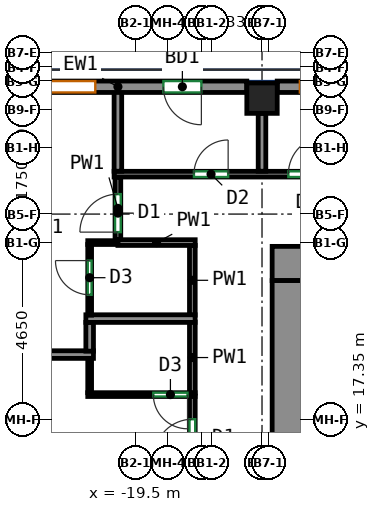
"""IFC4 building model, lengths in metres.
Left out: names, types, materials, properties, quantities, classifications, styles, units other than length and angle.
Written with IfcOpenShell. Run it as: python <this file> out.ifc"""

import sys

from ifc_helpers import new_model, si_unit, direction, frame, frame_2d, origin, origin_2d, place, context, subcontext, project, spatial, rectangle, extrude, source, transform, mapped, element, fill, save


model = new_model("IFC4")
c1 = context("Model", 3, precision=1e-05, world=origin(), true_north=direction((0.0, 1.0)))
c2 = subcontext(c1, "Body", "Model", "MODEL_VIEW")
j1 = project(units=[si_unit("LENGTHUNIT", "METRE"), si_unit("PLANEANGLEUNIT", "RADIAN")], contexts=[c1])
p1 = place(None, origin())
s1 = spatial("IfcSite", under=j1, at=p1, CompositionType="ELEMENT")
p2 = place(p1, origin())
s2 = spatial("IfcBuilding", under=s1, at=p2, CompositionType="ELEMENT")
p3 = place(p2, frame((0.0, 0.0, 168.5)))
s3 = spatial("IfcBuildingStorey", under=s2, at=p3, CompositionType="ELEMENT", Elevation=168.5)
m1 = source(origin(), c2, "Body", "SweptSolid", [
    extrude(rectangle(XDim=0.8, YDim=0.8, at=origin_2d()), origin(), (0.0, 0.0, 1.0), 3.12),
])
p4 = place(p3, frame((-16.167, 25.8, 0.0), z_axis=(0.0, 0.0, 1.0), x_axis=(1.0, 0.0, 0.0)))
e1 = element("IfcColumn", 1, at=p4, inside=s3, PredefinedType="COLUMN", context=c2, shape_type="MappedRepresentation", body=[
    mapped(m1, transform((0.0, 0.0, 0.0))),
])
m2 = source(origin(), c2, "Body", "SweptSolid", [
    extrude(rectangle(XDim=33.9, YDim=0.9, at=frame_2d((16.95, 0.0))), origin(), (0.0, 0.0, 1.0), 3.12),
])
p5 = place(p3, frame((-15.9, 21.45, 0.0), z_axis=(0.0, 0.0, 1.0), x_axis=(1.0, 0.0, 0.0)))
e2 = element("IfcWall", 2, at=p5, inside=s3, PredefinedType="SHEAR", context=c2, shape_type="MappedRepresentation", body=[
    mapped(m2, transform((0.0, 0.0, 0.0))),
])
p6 = place(p5, frame((8.42, 0.0, 0.0)))
e3 = element("IfcOpeningElement", 3, at=p6, cuts=e2, PredefinedType="OPENING", context=c2, shape_type="SweptSolid", body=[
    extrude(rectangle(XDim=0.9, YDim=2.1, at=frame_2d((0.45, 1.05))), frame((0.0, 0.46, 0.0), z_axis=(0.0, -1.0, 0.0), x_axis=(1.0, 0.0, 0.0)), (0.0, 0.0, 1.0), 0.92),
])
p7 = place(p5, frame((15.12, 0.0, 0.0)))
e4 = element("IfcOpeningElement", 4, at=p7, cuts=e2, PredefinedType="OPENING", context=c2, shape_type="SweptSolid", body=[
    extrude(rectangle(XDim=0.9, YDim=2.1, at=frame_2d((0.45, 1.05))), frame((0.0, 0.46, 0.0), z_axis=(0.0, -1.0, 0.0), x_axis=(1.0, 0.0, 0.0)), (0.0, 0.0, 1.0), 0.92),
])
p8 = place(p5, frame((19.944, 0.0, 0.0)))
e5 = element("IfcOpeningElement", 5, at=p8, cuts=e2, PredefinedType="OPENING", context=c2, shape_type="SweptSolid", body=[
    extrude(rectangle(XDim=0.9, YDim=2.1, at=frame_2d((0.45, 1.05))), frame((0.0, 0.46, 0.0), z_axis=(0.0, -1.0, 0.0), x_axis=(1.0, 0.0, 0.0)), (0.0, 0.0, 1.0), 0.92),
])
p9 = place(p5, frame((25.304, 0.0, 0.0)))
e6 = element("IfcOpeningElement", 6, at=p9, cuts=e2, PredefinedType="OPENING", context=c2, shape_type="SweptSolid", body=[
    extrude(rectangle(XDim=0.9, YDim=2.1, at=frame_2d((0.45, 1.05))), frame((0.0, 0.46, 0.0), z_axis=(0.0, -1.0, 0.0), x_axis=(1.0, 0.0, 0.0)), (0.0, 0.0, 1.0), 0.92),
])
p10 = place(p5, frame((2.425, 0.0, 0.0)))
e7 = element("IfcOpeningElement", 7, at=p10, cuts=e2, PredefinedType="OPENING", context=c2, shape_type="SweptSolid", body=[
    extrude(rectangle(XDim=0.9, YDim=2.1, at=frame_2d((0.45, 1.05))), frame((0.0, 0.46, 0.0), z_axis=(0.0, -1.0, 0.0), x_axis=(1.0, 0.0, 0.0)), (0.0, 0.0, 1.0), 0.92),
])
p11 = place(p5, frame((30.575, 0.0, 0.0)))
e8 = element("IfcOpeningElement", 8, at=p11, cuts=e2, PredefinedType="OPENING", context=c2, shape_type="SweptSolid", body=[
    extrude(rectangle(XDim=0.9, YDim=2.1, at=frame_2d((0.45, 1.05))), frame((0.0, 0.46, 0.0), z_axis=(0.0, -1.0, 0.0), x_axis=(1.0, 0.0, 0.0)), (0.0, 0.0, 1.0), 0.92),
])
m3 = source(origin(), c2, "Body", "SweptSolid", [
    extrude(rectangle(XDim=12.0, YDim=0.9, at=frame_2d((6.0, 0.0))), origin(), (0.0, 0.0, 1.0), 3.12),
])
p12 = place(p3, frame((-15.45, 9.0, 0.0), z_axis=(0.0, 0.0, 1.0), x_axis=(0.0, 1.0, 0.0)))
e9 = element("IfcWall", 9, at=p12, inside=s3, PredefinedType="SHEAR", context=c2, shape_type="MappedRepresentation", body=[
    mapped(m3, transform((0.0, 0.0, 0.0))),
])
m4 = source(origin(), c2, "Body", "SweptSolid", [
    extrude(rectangle(XDim=6.783, YDim=0.3, at=frame_2d((3.392, 0.0))), origin(), (0.0, 0.0, 1.0), 3.12),
])
p13 = place(p3, frame((-8.983, 26.1, 0.0), z_axis=(0.0, 0.0, 1.0), x_axis=(-1.0, 0.0, 0.0)))
e10 = element("IfcWall", 10, at=p13, inside=s3, PredefinedType="SOLIDWALL", context=c2, shape_type="MappedRepresentation", body=[
    mapped(m4, transform((0.0, 0.0, 0.0))),
])
p14 = place(p13, frame((1.196, 0.0, 0.0)))
e11 = element("IfcOpeningElement", 11, at=p14, cuts=e10, PredefinedType="OPENING", context=c2, shape_type="SweptSolid", body=[
    extrude(rectangle(XDim=1.0, YDim=2.1, at=frame_2d((0.5, 1.05))), frame((0.0, 0.16, 0.0), z_axis=(0.0, -1.0, 0.0), x_axis=(1.0, 0.0, 0.0)), (0.0, 0.0, 1.0), 0.32),
])
p15 = place(p13, frame((3.988, 0.0, 0.85)))
e12 = element("IfcOpeningElement", 12, at=p15, cuts=e10, PredefinedType="OPENING", context=c2, shape_type="SweptSolid", body=[
    extrude(rectangle(XDim=2.2, YDim=1.95, at=frame_2d((1.1, 0.975))), frame((0.0, 0.16, 0.0), z_axis=(0.0, -1.0, 0.0), x_axis=(1.0, 0.0, 0.0)), (0.0, 0.0, 1.0), 0.32),
])
m5 = source(origin(), c2, "Body", "SweptSolid", [
    extrude(rectangle(XDim=6.783, YDim=0.3, at=frame_2d((3.392, 0.0))), origin(), (0.0, 0.0, 1.0), 3.12),
])
p16 = place(p3, frame((-16.567, 26.1, 0.0), z_axis=(0.0, 0.0, 1.0), x_axis=(-1.0, 0.0, 0.0)))
e13 = element("IfcWall", 13, at=p16, inside=s3, PredefinedType="SOLIDWALL", context=c2, shape_type="MappedRepresentation", body=[
    mapped(m5, transform((0.0, 0.0, 0.0))),
])
p17 = place(p16, frame((1.196, 0.0, 0.0)))
e14 = element("IfcOpeningElement", 14, at=p17, cuts=e13, PredefinedType="OPENING", context=c2, shape_type="SweptSolid", body=[
    extrude(rectangle(XDim=1.0, YDim=2.1, at=frame_2d((0.5, 1.05))), frame((0.0, 0.16, 0.0), z_axis=(0.0, -1.0, 0.0), x_axis=(1.0, 0.0, 0.0)), (0.0, 0.0, 1.0), 0.32),
])
p18 = place(p16, frame((3.988, 0.0, 0.85)))
e15 = element("IfcOpeningElement", 15, at=p18, cuts=e13, PredefinedType="OPENING", context=c2, shape_type="SweptSolid", body=[
    extrude(rectangle(XDim=2.2, YDim=1.95, at=frame_2d((1.1, 0.975))), frame((0.0, 0.16, 0.0), z_axis=(0.0, -1.0, 0.0), x_axis=(1.0, 0.0, 0.0)), (0.0, 0.0, 1.0), 0.32),
])
p19 = place(p3, frame((-18.0, 14.927, 0.0), z_axis=(0.0, 0.0, 1.0), x_axis=(0.0, 1.0, 0.0)))
e16 = element("IfcWall", 16, at=p19, inside=s3, PredefinedType="PARTITIONING", context=c2, shape_type="SweptSolid", body=[
    extrude(rectangle(XDim=3.033, YDim=0.15, at=frame_2d((1.517, 0.0))), origin(), (0.0, 0.0, 1.0), 3.12),
])
p20 = place(p19, frame((1.425, 0.0, 0.0)))
e17 = element("IfcOpeningElement", 17, at=p20, cuts=e16, PredefinedType="OPENING", context=c2, shape_type="SweptSolid", body=[
    extrude(rectangle(XDim=1.0, YDim=2.1, at=frame_2d((0.5, 1.05))), frame((0.0, 0.085, 0.0), z_axis=(0.0, -1.0, 0.0), x_axis=(1.0, 0.0, 0.0)), (0.0, 0.0, 1.0), 0.17),
])
p21 = place(p3, frame((-18.0, 18.04, 0.0), z_axis=(0.0, 0.0, 1.0), x_axis=(0.0, 1.0, 0.0)))
e18 = element("IfcWall", 18, at=p21, inside=s3, PredefinedType="PARTITIONING", context=c2, shape_type="SweptSolid", body=[
    extrude(rectangle(XDim=1.87, YDim=0.15, at=frame_2d((0.935, 0.0))), origin(), (0.0, 0.0, 1.0), 3.12),
])
p22 = place(p3, frame((-19.959, 22.075, 0.0), z_axis=(0.0, 0.0, 1.0), x_axis=(0.0, 1.0, 0.0)))
e19 = element("IfcWall", 19, at=p22, inside=s3, PredefinedType="PARTITIONING", context=c2, shape_type="SweptSolid", body=[
    extrude(rectangle(XDim=1.65, YDim=0.15, at=frame_2d((0.825, 0.0))), origin(), (0.0, 0.0, 1.0), 3.12),
])
p23 = place(p22, frame((0.2, 0.0, 0.0)))
e20 = element("IfcOpeningElement", 20, at=p23, cuts=e19, PredefinedType="OPENING", context=c2, shape_type="SweptSolid", body=[
    extrude(rectangle(XDim=1.0, YDim=2.1, at=frame_2d((0.5, 1.05))), frame((0.0, 0.085, 0.0), z_axis=(0.0, -1.0, 0.0), x_axis=(1.0, 0.0, 0.0)), (0.0, 0.0, 1.0), 0.17),
])
p24 = place(p3, frame((-18.0, 20.09, 0.0), z_axis=(0.0, 0.0, 1.0), x_axis=(0.0, 1.0, 0.0)))
e21 = element("IfcWall", 21, at=p24, inside=s3, PredefinedType="PARTITIONING", context=c2, shape_type="SweptSolid", body=[
    extrude(rectangle(XDim=1.835, YDim=0.15, at=frame_2d((0.917, 0.0))), origin(), (0.0, 0.0, 1.0), 3.12),
])
p25 = place(p3, frame((-19.959, 22.0, 0.0), z_axis=(0.0, 0.0, 1.0), x_axis=(1.0, 0.0, 0.0)))
e22 = element("IfcWall", 22, at=p25, inside=s3, PredefinedType="PARTITIONING", context=c2, shape_type="SweptSolid", body=[
    extrude(rectangle(XDim=2.034, YDim=0.15, at=frame_2d((1.017, 0.0))), origin(), (0.0, 0.0, 1.0), 3.12),
])
p26 = place(p3, frame((-20.059, 23.8, 0.0), z_axis=(0.0, 0.0, 1.0), x_axis=(1.0, 0.0, 0.0)))
e23 = element("IfcWall", 23, at=p26, inside=s3, PredefinedType="PARTITIONING", context=c2, shape_type="SweptSolid", body=[
    extrude(rectangle(XDim=41.909, YDim=0.15, at=frame_2d((20.955, 0.0))), origin(), (0.0, 0.0, 1.0), 3.12),
])
p27 = place(p26, frame((2.101, 0.0, 0.0)))
e24 = element("IfcOpeningElement", 24, at=p27, cuts=e23, PredefinedType="OPENING", context=c2, shape_type="SweptSolid", body=[
    extrude(rectangle(XDim=0.9, YDim=2.1, at=frame_2d((0.45, 1.05))), frame((0.0, 0.085, 0.0), z_axis=(0.0, -1.0, 0.0), x_axis=(1.0, 0.0, 0.0)), (0.0, 0.0, 1.0), 0.17),
])
p28 = place(p26, frame((4.585, 0.0, 0.0)))
e25 = element("IfcOpeningElement", 25, at=p28, cuts=e23, PredefinedType="OPENING", context=c2, shape_type="SweptSolid", body=[
    extrude(rectangle(XDim=1.0, YDim=2.1, at=frame_2d((0.5, 1.05))), frame((0.0, 0.085, 0.0), z_axis=(0.0, -1.0, 0.0), x_axis=(1.0, 0.0, 0.0)), (0.0, 0.0, 1.0), 0.17),
])
p29 = place(p26, frame((8.175, 0.0, 0.0)))
e26 = element("IfcOpeningElement", 26, at=p29, cuts=e23, PredefinedType="OPENING", context=c2, shape_type="SweptSolid", body=[
    extrude(rectangle(XDim=0.9, YDim=2.1, at=frame_2d((0.45, 1.05))), frame((0.0, 0.085, 0.0), z_axis=(0.0, -1.0, 0.0), x_axis=(1.0, 0.0, 0.0)), (0.0, 0.0, 1.0), 0.17),
])
p30 = place(p26, frame((13.173, 0.0, 0.0)))
e27 = element("IfcOpeningElement", 27, at=p30, cuts=e23, PredefinedType="OPENING", context=c2, shape_type="SweptSolid", body=[
    extrude(rectangle(XDim=1.0, YDim=2.1, at=frame_2d((0.5, 1.05))), frame((0.0, 0.085, 0.0), z_axis=(0.0, -1.0, 0.0), x_axis=(1.0, 0.0, 0.0)), (0.0, 0.0, 1.0), 0.17),
])
p31 = place(p26, frame((15.658, 0.0, 0.0)))
e28 = element("IfcOpeningElement", 28, at=p31, cuts=e23, PredefinedType="OPENING", context=c2, shape_type="SweptSolid", body=[
    extrude(rectangle(XDim=0.9, YDim=2.1, at=frame_2d((0.45, 1.05))), frame((0.0, 0.085, 0.0), z_axis=(0.0, -1.0, 0.0), x_axis=(1.0, 0.0, 0.0)), (0.0, 0.0, 1.0), 0.17),
])
p32 = place(p26, frame((21.315, 0.0, 0.0)))
e29 = element("IfcOpeningElement", 29, at=p32, cuts=e23, PredefinedType="OPENING", context=c2, shape_type="SweptSolid", body=[
    extrude(rectangle(XDim=0.9, YDim=2.1, at=frame_2d((0.45, 1.05))), frame((0.0, 0.085, 0.0), z_axis=(0.0, -1.0, 0.0), x_axis=(1.0, 0.0, 0.0)), (0.0, 0.0, 1.0), 0.17),
])
p33 = place(p26, frame((24.625, 0.0, 0.0)))
e30 = element("IfcOpeningElement", 30, at=p33, cuts=e23, PredefinedType="OPENING", context=c2, shape_type="SweptSolid", body=[
    extrude(rectangle(XDim=1.0, YDim=2.1, at=frame_2d((0.5, 1.05))), frame((0.0, 0.085, 0.0), z_axis=(0.0, -1.0, 0.0), x_axis=(1.0, 0.0, 0.0)), (0.0, 0.0, 1.0), 0.17),
])
p34 = place(p26, frame((29.043, 0.0, 0.0)))
e31 = element("IfcOpeningElement", 31, at=p34, cuts=e23, PredefinedType="OPENING", context=c2, shape_type="SweptSolid", body=[
    extrude(rectangle(XDim=0.9, YDim=2.1, at=frame_2d((0.45, 1.05))), frame((0.0, 0.085, 0.0), z_axis=(0.0, -1.0, 0.0), x_axis=(1.0, 0.0, 0.0)), (0.0, 0.0, 1.0), 0.17),
])
p35 = place(p26, frame((32.735, 0.0, 0.0)))
e32 = element("IfcOpeningElement", 32, at=p35, cuts=e23, PredefinedType="OPENING", context=c2, shape_type="SweptSolid", body=[
    extrude(rectangle(XDim=1.0, YDim=2.1, at=frame_2d((0.5, 1.05))), frame((0.0, 0.085, 0.0), z_axis=(0.0, -1.0, 0.0), x_axis=(1.0, 0.0, 0.0)), (0.0, 0.0, 1.0), 0.17),
])
p36 = place(p26, frame((36.627, 0.0, 0.0)))
e33 = element("IfcOpeningElement", 33, at=p36, cuts=e23, PredefinedType="OPENING", context=c2, shape_type="SweptSolid", body=[
    extrude(rectangle(XDim=0.9, YDim=2.1, at=frame_2d((0.45, 1.05))), frame((0.0, 0.085, 0.0), z_axis=(0.0, -1.0, 0.0), x_axis=(1.0, 0.0, 0.0)), (0.0, 0.0, 1.0), 0.17),
])
p37 = place(p26, frame((38.808, 0.0, 0.0)))
e34 = element("IfcOpeningElement", 34, at=p37, cuts=e23, PredefinedType="OPENING", context=c2, shape_type="SweptSolid", body=[
    extrude(rectangle(XDim=0.9, YDim=2.1, at=frame_2d((0.45, 1.05))), frame((0.0, 0.085, 0.0), z_axis=(0.0, -1.0, 0.0), x_axis=(1.0, 0.0, 0.0)), (0.0, 0.0, 1.0), 0.17),
])
p38 = place(p3, frame((-17.927, 18.0, 0.0), z_axis=(0.0, 0.0, 1.0), x_axis=(-1.0, 0.0, 0.0)))
e35 = element("IfcWall", 35, at=p38, inside=s3, PredefinedType="PARTITIONING", context=c2, shape_type="SweptSolid", body=[
    extrude(rectangle(XDim=2.825, YDim=0.1, at=frame_2d((1.413, 0.0))), origin(), (0.0, 0.0, 1.0), 3.12),
])
p39 = place(p38, frame((0.2, 0.0, 0.0)))
e36 = element("IfcOpeningElement", 36, at=p39, cuts=e35, PredefinedType="OPENING", context=c2, shape_type="SweptSolid", body=[
    extrude(rectangle(XDim=0.9, YDim=2.1, at=frame_2d((0.45, 1.05))), frame((0.0, 0.06, 0.0), z_axis=(0.0, -1.0, 0.0), x_axis=(1.0, 0.0, 0.0)), (0.0, 0.0, 1.0), 0.12),
])
p40 = place(p3, frame((-20.702, 18.05, 0.0), z_axis=(0.0, 0.0, 1.0), x_axis=(0.0, 1.0, 0.0)))
e37 = element("IfcWall", 37, at=p40, inside=s3, PredefinedType="PARTITIONING", context=c2, shape_type="SweptSolid", body=[
    extrude(rectangle(XDim=0.903, YDim=0.1, at=frame_2d((0.451, 0.0))), origin(), (0.0, 0.0, 1.0), 3.12),
])
p41 = place(p3, frame((-20.602, 19.053, 0.0), z_axis=(0.0, 0.0, 1.0), x_axis=(-1.0, 0.0, 0.0)))
e38 = element("IfcWall", 38, at=p41, inside=s3, PredefinedType="PARTITIONING", context=c2, shape_type="SweptSolid", body=[
    extrude(rectangle(XDim=6.398, YDim=0.2, at=frame_2d((3.199, 0.0))), origin(), (0.0, 0.0, 1.0), 3.12),
])
p42 = place(p3, frame((-20.702, 19.9, 0.0), z_axis=(0.0, 0.0, 1.0), x_axis=(0.0, -1.0, 0.0)))
e39 = element("IfcWall", 39, at=p42, inside=s3, PredefinedType="PARTITIONING", context=c2, shape_type="SweptSolid", body=[
    extrude(rectangle(XDim=0.757, YDim=0.2, at=frame_2d((0.378, 0.0))), origin(), (0.0, 0.0, 1.0), 3.12),
])
p43 = place(p3, frame((-17.927, 20.0, 0.0), z_axis=(0.0, 0.0, 1.0), x_axis=(-1.0, 0.0, 0.0)))
e40 = element("IfcWall", 40, at=p43, inside=s3, PredefinedType="PARTITIONING", context=c2, shape_type="SweptSolid", body=[
    extrude(rectangle(XDim=2.875, YDim=0.2, at=frame_2d((1.438, 0.0))), origin(), (0.0, 0.0, 1.0), 3.12),
])
p44 = place(p3, frame((-20.752, 22.0, 0.0), z_axis=(0.0, 0.0, 1.0), x_axis=(1.0, 0.0, 0.0)))
e41 = element("IfcWall", 41, at=p44, inside=s3, PredefinedType="PARTITIONING", context=c2, shape_type="SweptSolid", body=[
    extrude(rectangle(XDim=0.791, YDim=0.1, at=frame_2d((0.396, 0.0))), origin(), (0.0, 0.0, 1.0), 3.12),
])
p45 = place(p3, frame((-20.702, 20.09, 0.0), z_axis=(0.0, 0.0, 1.0), x_axis=(0.0, 1.0, 0.0)))
e42 = element("IfcWall", 42, at=p45, inside=s3, PredefinedType="PARTITIONING", context=c2, shape_type="SweptSolid", body=[
    extrude(rectangle(XDim=1.86, YDim=0.1, at=frame_2d((0.93, 0.0))), origin(), (0.0, 0.0, 1.0), 3.12),
])
p46 = place(p45, frame((0.536, 0.0, 0.0)))
e43 = element("IfcOpeningElement", 43, at=p46, cuts=e42, PredefinedType="OPENING", context=c2, shape_type="SweptSolid", body=[
    extrude(rectangle(XDim=0.9, YDim=2.1, at=frame_2d((0.45, 1.05))), frame((0.0, 0.06, 0.0), z_axis=(0.0, -1.0, 0.0), x_axis=(1.0, 0.0, 0.0)), (0.0, 0.0, 1.0), 0.12),
])
p47 = place(p3, frame((-19.959, 23.877, 0.0), z_axis=(0.0, 0.0, 1.0), x_axis=(0.0, 1.0, 0.0)))
e44 = element("IfcWall", 44, at=p47, inside=s3, PredefinedType="PARTITIONING", context=c2, shape_type="SweptSolid", body=[
    extrude(rectangle(XDim=2.123, YDim=0.2, at=frame_2d((1.062, 0.0))), origin(), (0.0, 0.0, 1.0), 3.12),
])
p48 = place(p3, frame((-16.167, 23.877, 0.0), z_axis=(0.0, 0.0, 1.0), x_axis=(0.0, 1.0, 0.0)))
e45 = element("IfcWall", 45, at=p48, inside=s3, PredefinedType="PARTITIONING", context=c2, shape_type="SweptSolid", body=[
    extrude(rectangle(XDim=1.523, YDim=0.2, at=frame_2d((0.761, 0.0))), origin(), (0.0, 0.0, 1.0), 3.12),
])
p49 = place(p15, origin())
e46 = element("IfcWindow", 46, at=p49, inside=s3, PartitioningType="SINGLE_PANEL", PredefinedType="WINDOW", context=c2, shape_type="SweptSolid", body=[
    extrude(rectangle(XDim=2.2, YDim=1.95, at=frame_2d((1.1, 0.975))), frame((0.0, 0.03, 0.0), z_axis=(0.0, -1.0, 0.0), x_axis=(1.0, 0.0, 0.0)), (0.0, 0.0, 1.0), 0.06),
])
fill(e12, e46)
p50 = place(p17, origin())
e47 = element("IfcDoor", 47, at=p50, inside=s3, OperationType="SINGLE_SWING_LEFT", PredefinedType="DOOR", context=c2, shape_type="SweptSolid", body=[
    extrude(rectangle(XDim=1.0, YDim=2.1, at=frame_2d((0.5, 1.05))), frame((0.0, 0.025, 0.0), z_axis=(0.0, -1.0, 0.0), x_axis=(1.0, 0.0, 0.0)), (0.0, 0.0, 1.0), 0.05),
])
fill(e14, e47)
p51 = place(p18, origin())
e48 = element("IfcWindow", 48, at=p51, inside=s3, PartitioningType="SINGLE_PANEL", PredefinedType="WINDOW", context=c2, shape_type="SweptSolid", body=[
    extrude(rectangle(XDim=2.2, YDim=1.95, at=frame_2d((1.1, 0.975))), frame((0.0, 0.03, 0.0), z_axis=(0.0, -1.0, 0.0), x_axis=(1.0, 0.0, 0.0)), (0.0, 0.0, 1.0), 0.06),
])
fill(e15, e48)
p52 = place(p20, origin())
e49 = element("IfcDoor", 49, at=p52, inside=s3, OperationType="SINGLE_SWING_LEFT", PredefinedType="DOOR", context=c2, shape_type="SweptSolid", body=[
    extrude(rectangle(XDim=1.0, YDim=2.1, at=frame_2d((0.5, 1.05))), frame((0.0, 0.025, 0.0), z_axis=(0.0, -1.0, 0.0), x_axis=(1.0, 0.0, 0.0)), (0.0, 0.0, 1.0), 0.05),
])
fill(e17, e49)
p53 = place(p39, origin())
e50 = element("IfcDoor", 50, at=p53, inside=s3, OperationType="SINGLE_SWING_LEFT", PredefinedType="DOOR", context=c2, shape_type="SweptSolid", body=[
    extrude(rectangle(XDim=0.9, YDim=2.1, at=frame_2d((0.45, 1.05))), frame((0.0, 0.025, 0.0), z_axis=(0.0, -1.0, 0.0), x_axis=(1.0, 0.0, 0.0)), (0.0, 0.0, 1.0), 0.05),
])
fill(e36, e50)
p54 = place(p46, origin())
e51 = element("IfcDoor", 51, at=p54, inside=s3, OperationType="SINGLE_SWING_RIGHT", PredefinedType="DOOR", context=c2, shape_type="SweptSolid", body=[
    extrude(rectangle(XDim=0.9, YDim=2.1, at=frame_2d((0.45, 1.05))), frame((0.0, 0.025, 0.0), z_axis=(0.0, -1.0, 0.0), x_axis=(1.0, 0.0, 0.0)), (0.0, 0.0, 1.0), 0.05),
])
fill(e43, e51)
p55 = place(p23, origin())
e52 = element("IfcDoor", 52, at=p55, inside=s3, OperationType="SINGLE_SWING_LEFT", PredefinedType="DOOR", context=c2, shape_type="SweptSolid", body=[
    extrude(rectangle(XDim=1.0, YDim=2.1, at=frame_2d((0.5, 1.05))), frame((0.0, 0.025, 0.0), z_axis=(0.0, -1.0, 0.0), x_axis=(1.0, 0.0, 0.0)), (0.0, 0.0, 1.0), 0.05),
])
fill(e20, e52)
p56 = place(p27, origin())
e53 = element("IfcDoor", 53, at=p56, inside=s3, OperationType="SINGLE_SWING_RIGHT", PredefinedType="DOOR", context=c2, shape_type="SweptSolid", body=[
    extrude(rectangle(XDim=0.9, YDim=2.1, at=frame_2d((0.45, 1.05))), frame((0.0, 0.025, 0.0), z_axis=(0.0, -1.0, 0.0), x_axis=(1.0, 0.0, 0.0)), (0.0, 0.0, 1.0), 0.05),
])
fill(e24, e53)
p57 = place(p28, origin())
e54 = element("IfcDoor", 54, at=p57, inside=s3, OperationType="SINGLE_SWING_RIGHT", PredefinedType="DOOR", context=c2, shape_type="SweptSolid", body=[
    extrude(rectangle(XDim=1.0, YDim=2.1, at=frame_2d((0.5, 1.05))), frame((0.0, 0.025, 0.0), z_axis=(0.0, -1.0, 0.0), x_axis=(1.0, 0.0, 0.0)), (0.0, 0.0, 1.0), 0.05),
])
fill(e25, e54)
save(model, sys.argv[1])
